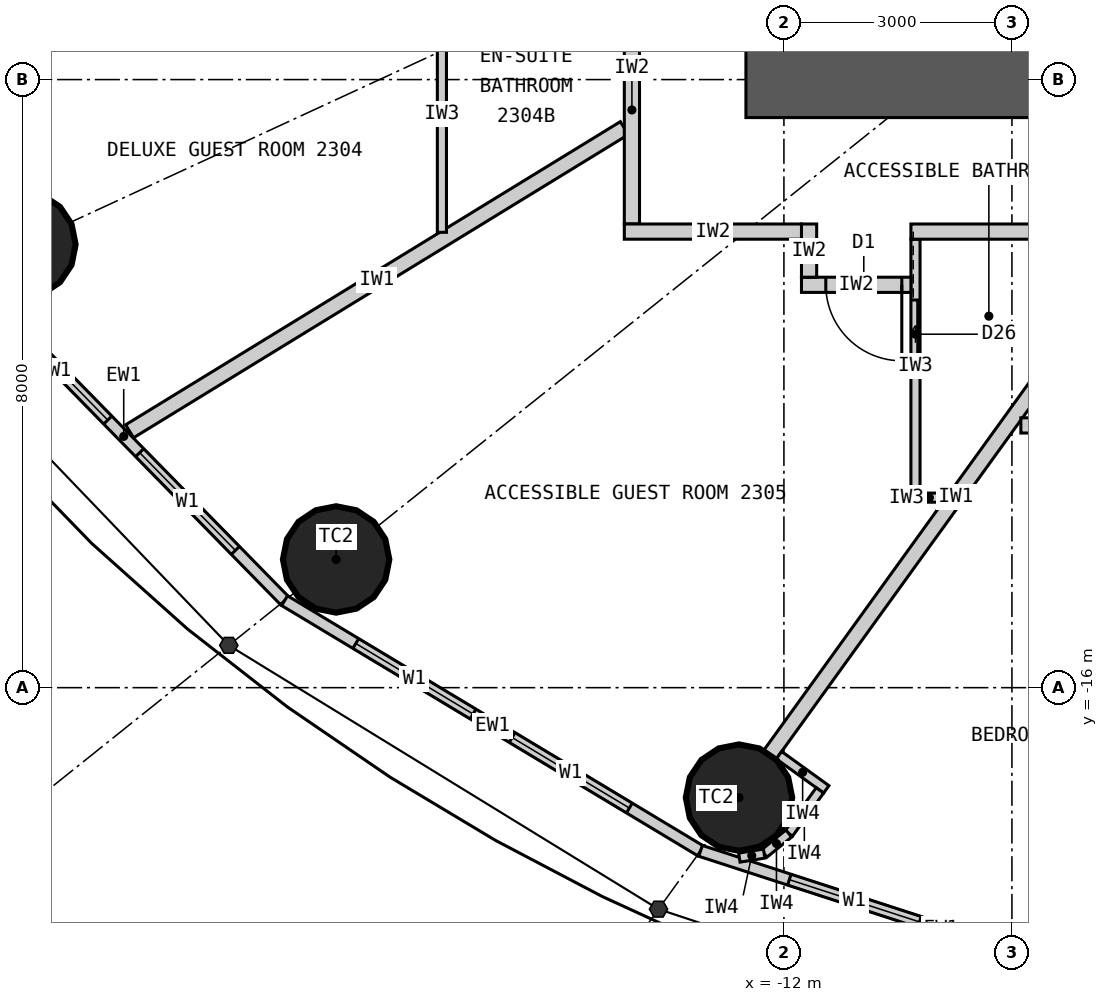
"""IFC4 building model, lengths in metres.
Left out: names, types, materials, properties, quantities, classifications, styles, units other than length and angle.
Written with IfcOpenShell. Run it as: python <this file> out.ifc"""

import sys

from ifc_helpers import new_model, si_unit, direction, frame, frame_2d, origin, origin_2d, place, context, subcontext, project, spatial, rectangle, circle, extrude, clip, halfspace, element, fill, save


model = new_model("IFC4")
c1 = context("Model", 3, precision=1e-05, world=origin(), true_north=direction((0.0, 1.0)))
c2 = subcontext(c1, "Body", "Model", "MODEL_VIEW")
j1 = project(units=[si_unit("LENGTHUNIT", "METRE"), si_unit("PLANEANGLEUNIT", "RADIAN")], contexts=[c1])
p1 = place(None, origin())
s1 = spatial("IfcSite", under=j1, at=p1, CompositionType="ELEMENT")
p2 = place(p1, origin())
s2 = spatial("IfcBuilding", under=s1, at=p2, CompositionType="ELEMENT")
p3 = place(p2, frame((0.0, 0.0, 90.3)))
s3 = spatial("IfcBuildingStorey", under=s2, at=p3, CompositionType="ELEMENT", Elevation=90.3)
for number, where, z_axis, x_axis in (
    (1, (-22.019, -10.17, 0.0), (0.0, 0.0, 1.0), (1.0, 0.0, 0.0)),
    (2, (-17.892, -14.313, 0.0), (0.0, 0.0, 1.0), (1.0, 0.0, 0.0)),
    (3, (-12.591, -17.447, 0.0), (0.0, 0.0, 1.0), (1.0, 0.0, 0.0)),
):
    element("IfcColumn", number, at=place(p3, frame(where, z_axis=z_axis, x_axis=x_axis)), inside=s3, PredefinedType="COLUMN", context=c2, shape_type="Clipping", body=[
        clip(extrude(circle(Radius=0.7, at=origin_2d()), origin(), (0.0, 0.0, 1.0), 3.3), halfspace(frame((0.0, 0.0, 2.25), z_axis=(0.0, 0.0, 1.0), x_axis=(1.0, 0.0, 0.0)), False)),
    ])
p4 = place(p3, frame((12.5, -8.0, 0.0), z_axis=(0.0, 0.0, 1.0), x_axis=(-1.0, 0.0, 0.0)))
e4 = element("IfcWall", 4, at=p4, inside=s3, PredefinedType="SHEAR", context=c2, shape_type="SweptSolid", body=[
    extrude(rectangle(XDim=25.0, YDim=1.0, at=frame_2d((12.5, 0.0))), origin(), (0.0, 0.0, 1.0), 3.3),
])
p5 = place(p4, frame((11.2, 0.0, 0.0)))
e5 = element("IfcOpeningElement", 5, at=p5, cuts=e4, PredefinedType="OPENING", context=c2, shape_type="SweptSolid", body=[
    extrude(rectangle(XDim=1.2, YDim=2.2, at=frame_2d((0.6, 1.1))), frame((0.0, 0.51, 0.0), z_axis=(0.0, -1.0, 0.0), x_axis=(1.0, 0.0, 0.0)), (0.0, 0.0, 1.0), 1.02),
])
p6 = place(p4, frame((18.8, 0.0, 0.0)))
e6 = element("IfcOpeningElement", 6, at=p6, cuts=e4, PredefinedType="OPENING", context=c2, shape_type="SweptSolid", body=[
    extrude(rectangle(XDim=0.9, YDim=2.2, at=frame_2d((0.45, 1.1))), frame((0.0, 0.51, 0.0), z_axis=(0.0, -1.0, 0.0), x_axis=(1.0, 0.0, 0.0)), (0.0, 0.0, 1.0), 1.02),
])
p7 = place(p3, frame((-22.803, -10.532, 0.0), z_axis=(0.0, 0.0, 1.0), x_axis=(0.699602905915, -0.714531856557, 0.0)))
e7 = element("IfcWall", 7, at=p7, inside=s3, PredefinedType="ELEMENTEDWALL", context=c2, shape_type="SweptSolid", body=[
    extrude(rectangle(XDim=6.051, YDim=0.15, at=frame_2d((3.025, 0.0))), origin(), (0.0, 0.0, 1.0), 3.05),
])
p8 = place(p7, frame((0.926, 0.0, 0.9)))
e8 = element("IfcOpeningElement", 8, at=p8, cuts=e7, PredefinedType="OPENING", context=c2, shape_type="SweptSolid", body=[
    extrude(rectangle(XDim=1.8, YDim=1.9, at=frame_2d((0.9, 0.95))), frame((0.0, 0.085, 0.0), z_axis=(0.0, -1.0, 0.0), x_axis=(1.0, 0.0, 0.0)), (0.0, 0.0, 1.0), 0.17),
])
p9 = place(p7, frame((3.325, 0.0, 0.9)))
e9 = element("IfcOpeningElement", 9, at=p9, cuts=e7, PredefinedType="OPENING", context=c2, shape_type="SweptSolid", body=[
    extrude(rectangle(XDim=1.8, YDim=1.9, at=frame_2d((0.9, 0.95))), frame((0.0, 0.085, 0.0), z_axis=(0.0, -1.0, 0.0), x_axis=(1.0, 0.0, 0.0)), (0.0, 0.0, 1.0), 0.17),
])
p10 = place(p3, frame((-18.57, -14.856, 0.0), z_axis=(0.0, 0.0, 1.0), x_axis=(0.856983180864, -0.515344377787, 0.0)))
e10 = element("IfcWall", 10, at=p10, inside=s3, PredefinedType="ELEMENTEDWALL", context=c2, shape_type="SweptSolid", body=[
    extrude(rectangle(XDim=6.386, YDim=0.15, at=frame_2d((3.193, 0.0))), origin(), (0.0, 0.0, 1.0), 3.05),
])
p11 = place(p10, frame((1.093, 0.0, 0.9)))
e11 = element("IfcOpeningElement", 11, at=p11, cuts=e10, PredefinedType="OPENING", context=c2, shape_type="SweptSolid", body=[
    extrude(rectangle(XDim=1.8, YDim=1.9, at=frame_2d((0.9, 0.95))), frame((0.0, 0.085, 0.0), z_axis=(0.0, -1.0, 0.0), x_axis=(1.0, 0.0, 0.0)), (0.0, 0.0, 1.0), 0.17),
])
p12 = place(p10, frame((3.493, 0.0, 0.9)))
e12 = element("IfcOpeningElement", 12, at=p12, cuts=e10, PredefinedType="OPENING", context=c2, shape_type="SweptSolid", body=[
    extrude(rectangle(XDim=1.8, YDim=1.9, at=frame_2d((0.9, 0.95))), frame((0.0, 0.085, 0.0), z_axis=(0.0, -1.0, 0.0), x_axis=(1.0, 0.0, 0.0)), (0.0, 0.0, 1.0), 0.17),
])
p13 = place(p3, frame((-13.096, -18.147, 0.0), z_axis=(0.0, 0.0, 1.0), x_axis=(0.951137534625, -0.308767534285, 0.0)))
e13 = element("IfcWall", 13, at=p13, inside=s3, PredefinedType="ELEMENTEDWALL", context=c2, shape_type="SweptSolid", body=[
    extrude(rectangle(XDim=6.655, YDim=0.15, at=frame_2d((3.328, 0.0))), origin(), (0.0, 0.0, 1.0), 3.05),
])
p14 = place(p13, frame((1.228, 0.0, 0.9)))
e14 = element("IfcOpeningElement", 14, at=p14, cuts=e13, PredefinedType="OPENING", context=c2, shape_type="SweptSolid", body=[
    extrude(rectangle(XDim=1.8, YDim=1.9, at=frame_2d((0.9, 0.95))), frame((0.0, 0.085, 0.0), z_axis=(0.0, -1.0, 0.0), x_axis=(1.0, 0.0, 0.0)), (0.0, 0.0, 1.0), 0.17),
])
p15 = place(p13, frame((3.628, 0.0, 0.9)))
e15 = element("IfcOpeningElement", 15, at=p15, cuts=e13, PredefinedType="OPENING", context=c2, shape_type="SweptSolid", body=[
    extrude(rectangle(XDim=1.8, YDim=1.9, at=frame_2d((0.9, 0.95))), frame((0.0, 0.085, 0.0), z_axis=(0.0, -1.0, 0.0), x_axis=(1.0, 0.0, 0.0)), (0.0, 0.0, 1.0), 0.17),
])
p16 = place(p3, frame((-14.1, -4.663, 0.0), z_axis=(0.0, 0.0, 1.0), x_axis=(-0.949432655039, -0.31397075269, 0.0)))
e16 = element("IfcWall", 16, at=p16, inside=s3, PredefinedType="PARTITIONING", context=c2, shape_type="SweptSolid", body=[
    extrude(rectangle(XDim=10.486, YDim=0.2, at=frame_2d((5.243, 0.0))), origin(), (0.0, 0.0, 1.0), 3.05),
])
p17 = place(p3, frame((-14.1, -8.639, 0.0), z_axis=(0.0, 0.0, 1.0), x_axis=(-0.852672493023, -0.522445805459, 0.0)))
e17 = element("IfcWall", 17, at=p17, inside=s3, PredefinedType="PARTITIONING", context=c2, shape_type="SweptSolid", body=[
    extrude(rectangle(XDim=7.633, YDim=0.2, at=frame_2d((3.817, 0.0))), origin(), (0.0, 0.0, 1.0), 3.05),
])
p18 = place(p3, frame((-7.289, -10.1, 0.0), z_axis=(0.0, 0.0, 1.0), x_axis=(-0.585198353053, -0.810890182197, 0.0)))
e18 = element("IfcWall", 18, at=p18, inside=s3, PredefinedType="PARTITIONING", context=c2, shape_type="SweptSolid", body=[
    extrude(rectangle(XDim=8.36, YDim=0.2, at=frame_2d((4.18, 0.0))), origin(), (0.0, 0.0, 1.0), 2.15),
])
p19 = place(p3, frame((-16.5, -10.01, 0.0), z_axis=(0.0, 0.0, 1.0), x_axis=(0.0, 1.0, 0.0)))
e19 = element("IfcWall", 19, at=p19, inside=s3, PredefinedType="PARTITIONING", context=c2, shape_type="SweptSolid", body=[
    extrude(rectangle(XDim=3.111, YDim=0.12, at=frame_2d((1.555, 0.0))), origin(), (0.0, 0.0, 1.0), 3.05),
])
p20 = place(p3, frame((-9.843, -13.5, 0.0), z_axis=(0.0, 0.0, 1.0), x_axis=(-1.0, 0.0, 0.0)))
e20 = element("IfcWall", 20, at=p20, inside=s3, PredefinedType="PARTITIONING", context=c2, shape_type="SweptSolid", body=[
    extrude(rectangle(XDim=0.486, YDim=0.12, at=frame_2d((0.243, 0.0))), origin(), (0.0, 0.0, 1.0), 3.05),
])
p21 = place(p3, frame((-10.269, -10.1, 0.0), z_axis=(0.0, 0.0, 1.0), x_axis=(0.0, -1.0, 0.0)))
e21 = element("IfcWall", 21, at=p21, inside=s3, PredefinedType="PARTITIONING", context=c2, shape_type="SweptSolid", body=[
    extrude(rectangle(XDim=3.34, YDim=0.12, at=frame_2d((1.67, 0.0))), origin(), (0.0, 0.0, 1.0), 3.05),
])
p22 = place(p21, frame((0.8, 0.0, 0.0)))
e22 = element("IfcOpeningElement", 22, at=p22, cuts=e21, PredefinedType="OPENING", context=c2, shape_type="SweptSolid", body=[
    extrude(rectangle(XDim=0.9, YDim=2.1, at=frame_2d((0.45, 1.05))), frame((0.0, 0.07, 0.0), z_axis=(0.0, -1.0, 0.0), x_axis=(1.0, 0.0, 0.0)), (0.0, 0.0, 1.0), 0.14),
])
p23 = place(p3, frame((-8.883, -12.55, 0.0), z_axis=(0.0, 0.0, 1.0), x_axis=(1.0, 0.0, 0.0)))
e23 = element("IfcWall", 23, at=p23, inside=s3, PredefinedType="PARTITIONING", context=c2, shape_type="SweptSolid", body=[
    extrude(rectangle(XDim=17.765, YDim=0.2, at=frame_2d((8.883, 0.0))), origin(), (0.0, 0.0, 1.0), 3.05),
])
p24 = place(p23, frame((3.42, 0.0, 0.0)))
e24 = element("IfcOpeningElement", 24, at=p24, cuts=e23, PredefinedType="OPENING", context=c2, shape_type="SweptSolid", body=[
    extrude(rectangle(XDim=0.8, YDim=2.1, at=frame_2d((0.4, 1.05))), frame((0.0, 0.11, 0.0), z_axis=(0.0, -1.0, 0.0), x_axis=(1.0, 0.0, 0.0)), (0.0, 0.0, 1.0), 0.22),
])
p25 = place(p23, frame((13.52, 0.0, 0.0)))
e25 = element("IfcOpeningElement", 25, at=p25, cuts=e23, PredefinedType="OPENING", context=c2, shape_type="SweptSolid", body=[
    extrude(rectangle(XDim=0.8, YDim=2.1, at=frame_2d((0.4, 1.05))), frame((0.0, 0.11, 0.0), z_axis=(0.0, -1.0, 0.0), x_axis=(1.0, 0.0, 0.0)), (0.0, 0.0, 1.0), 0.22),
])
p26 = place(p23, frame((8.42, 0.0, 0.0)))
e26 = element("IfcOpeningElement", 26, at=p26, cuts=e23, PredefinedType="OPENING", context=c2, shape_type="SweptSolid", body=[
    extrude(rectangle(XDim=0.9, YDim=2.1, at=frame_2d((0.45, 1.05))), frame((0.0, 0.11, 0.0), z_axis=(0.0, -1.0, 0.0), x_axis=(1.0, 0.0, 0.0)), (0.0, 0.0, 1.0), 0.22),
])
p27 = place(p3, frame((-10.329, -10.7, 0.0), z_axis=(0.0, 0.0, 1.0), x_axis=(-1.0, 0.0, 0.0)))
e27 = element("IfcWall", 27, at=p27, inside=s3, PredefinedType="PARTITIONING", context=c2, shape_type="SweptSolid", body=[
    extrude(rectangle(XDim=1.44, YDim=0.2, at=frame_2d((0.72, 0.0))), origin(), (0.0, 0.0, 1.0), 3.05),
])
p28 = place(p27, frame((0.12, 0.0, 0.0)))
e28 = element("IfcOpeningElement", 28, at=p28, cuts=e27, PredefinedType="OPENING", context=c2, shape_type="SweptSolid", body=[
    extrude(rectangle(XDim=1.0, YDim=2.2, at=frame_2d((0.5, 1.1))), frame((0.0, 0.11, 0.0), z_axis=(0.0, -1.0, 0.0), x_axis=(1.0, 0.0, 0.0)), (0.0, 0.0, 1.0), 0.22),
])
p29 = place(p3, frame((-11.669, -9.9, 0.0), z_axis=(0.0, 0.0, 1.0), x_axis=(0.0, -1.0, 0.0)))
e29 = element("IfcWall", 29, at=p29, inside=s3, PredefinedType="PARTITIONING", context=c2, shape_type="SweptSolid", body=[
    extrude(rectangle(XDim=0.7, YDim=0.2, at=frame_2d((0.35, 0.0))), origin(), (0.0, 0.0, 1.0), 3.05),
])
p30 = place(p3, frame((-14.0, -6.899, 0.0), z_axis=(0.0, 0.0, 1.0), x_axis=(0.0, -1.0, 0.0)))
e30 = element("IfcWall", 30, at=p30, inside=s3, PredefinedType="PARTITIONING", context=c2, shape_type="SweptSolid", body=[
    extrude(rectangle(XDim=3.001, YDim=0.2, at=frame_2d((1.5, 0.0))), origin(), (0.0, 0.0, 1.0), 3.05),
])
p31 = place(p3, frame((14.1, -10.0, 0.0), z_axis=(0.0, 0.0, 1.0), x_axis=(-1.0, 0.0, 0.0)))
e31 = element("IfcWall", 31, at=p31, inside=s3, PredefinedType="PARTITIONING", context=c2, shape_type="SweptSolid", body=[
    extrude(rectangle(XDim=24.429, YDim=0.2, at=frame_2d((12.215, 0.0))), origin(), (0.0, 0.0, 1.0), 3.05),
])
p32 = place(p31, frame((13.597, 0.0, 0.0)))
e32 = element("IfcOpeningElement", 32, at=p32, cuts=e31, PredefinedType="OPENING", context=c2, shape_type="SweptSolid", body=[
    extrude(rectangle(XDim=1.0, YDim=2.2, at=frame_2d((0.5, 1.1))), frame((0.0, 0.11, 0.0), z_axis=(0.0, -1.0, 0.0), x_axis=(1.0, 0.0, 0.0)), (0.0, 0.0, 1.0), 0.22),
])
p33 = place(p3, frame((-11.769, -10.0, 0.0), z_axis=(0.0, 0.0, 1.0), x_axis=(-1.0, 0.0, 0.0)))
e33 = element("IfcWall", 33, at=p33, inside=s3, PredefinedType="PARTITIONING", context=c2, shape_type="SweptSolid", body=[
    extrude(rectangle(XDim=2.331, YDim=0.2, at=frame_2d((1.166, 0.0))), origin(), (0.0, 0.0, 1.0), 3.05),
])
p34 = place(p3, frame((-12.065, -16.889, 0.0), z_axis=(0.0, 0.0, 1.0), x_axis=(0.810821798253, -0.585293098778, 0.0)))
e34 = element("IfcWall", 34, at=p34, inside=s3, PredefinedType="PARTITIONING", context=c2, shape_type="SweptSolid", body=[
    extrude(rectangle(XDim=0.768, YDim=0.12, at=frame_2d((0.384, 0.0))), origin(), (0.0, 0.0, 1.0), 3.05),
])
p35 = place(p3, frame((-11.526, -17.351, 0.0), z_axis=(0.0, 0.0, 1.0), x_axis=(-0.585223113993, -0.810872312296, 0.0)))
e35 = element("IfcWall", 35, at=p35, inside=s3, PredefinedType="PARTITIONING", context=c2, shape_type="SweptSolid", body=[
    extrude(rectangle(XDim=0.7, YDim=0.12, at=frame_2d((0.35, 0.0))), origin(), (0.0, 0.0, 1.0), 3.05),
])
p36 = place(p3, frame((-11.936, -17.919, 0.0), z_axis=(0.0, 0.0, 1.0), x_axis=(-0.775023088441, -0.631932917629, 0.0)))
e36 = element("IfcWall", 36, at=p36, inside=s3, PredefinedType="PARTITIONING", context=c2, shape_type="SweptSolid", body=[
    extrude(rectangle(XDim=0.418, YDim=0.12, at=frame_2d((0.209, 0.0))), origin(), (0.0, 0.0, 1.0), 3.05),
])
p37 = place(p3, frame((-12.26, -18.183, 0.0), z_axis=(0.0, 0.0, 1.0), x_axis=(-0.987218661664, -0.159371622511, 0.0)))
e37 = element("IfcWall", 37, at=p37, inside=s3, PredefinedType="PARTITIONING", context=c2, shape_type="SweptSolid", body=[
    extrude(rectangle(XDim=0.331, YDim=0.12, at=frame_2d((0.166, 0.0))), origin(), (0.0, 0.0, 1.0), 3.05),
])
p38 = place(p8, origin())
e38 = element("IfcWindow", 38, at=p38, inside=s3, PartitioningType="SINGLE_PANEL", PredefinedType="WINDOW", context=c2, shape_type="SweptSolid", body=[
    extrude(rectangle(XDim=1.8, YDim=1.9, at=frame_2d((0.9, 0.95))), frame((0.0, 0.03, 0.0), z_axis=(0.0, -1.0, 0.0), x_axis=(1.0, 0.0, 0.0)), (0.0, 0.0, 1.0), 0.06),
])
fill(e8, e38)
p39 = place(p9, origin())
e39 = element("IfcWindow", 39, at=p39, inside=s3, PartitioningType="SINGLE_PANEL", PredefinedType="WINDOW", context=c2, shape_type="SweptSolid", body=[
    extrude(rectangle(XDim=1.8, YDim=1.9, at=frame_2d((0.9, 0.95))), frame((0.0, 0.03, 0.0), z_axis=(0.0, -1.0, 0.0), x_axis=(1.0, 0.0, 0.0)), (0.0, 0.0, 1.0), 0.06),
])
fill(e9, e39)
p40 = place(p11, origin())
e40 = element("IfcWindow", 40, at=p40, inside=s3, PartitioningType="SINGLE_PANEL", PredefinedType="WINDOW", context=c2, shape_type="SweptSolid", body=[
    extrude(rectangle(XDim=1.8, YDim=1.9, at=frame_2d((0.9, 0.95))), frame((0.0, 0.03, 0.0), z_axis=(0.0, -1.0, 0.0), x_axis=(1.0, 0.0, 0.0)), (0.0, 0.0, 1.0), 0.06),
])
fill(e11, e40)
p41 = place(p12, origin())
e41 = element("IfcWindow", 41, at=p41, inside=s3, PartitioningType="SINGLE_PANEL", PredefinedType="WINDOW", context=c2, shape_type="SweptSolid", body=[
    extrude(rectangle(XDim=1.8, YDim=1.9, at=frame_2d((0.9, 0.95))), frame((0.0, 0.03, 0.0), z_axis=(0.0, -1.0, 0.0), x_axis=(1.0, 0.0, 0.0)), (0.0, 0.0, 1.0), 0.06),
])
fill(e12, e41)
p42 = place(p14, origin())
e42 = element("IfcWindow", 42, at=p42, inside=s3, PartitioningType="SINGLE_PANEL", PredefinedType="WINDOW", context=c2, shape_type="SweptSolid", body=[
    extrude(rectangle(XDim=1.8, YDim=1.9, at=frame_2d((0.9, 0.95))), frame((0.0, 0.03, 0.0), z_axis=(0.0, -1.0, 0.0), x_axis=(1.0, 0.0, 0.0)), (0.0, 0.0, 1.0), 0.06),
])
fill(e14, e42)
p43 = place(p22, origin())
e43 = element("IfcDoor", 43, at=p43, inside=s3, OperationType="SLIDING_TO_LEFT", PredefinedType="DOOR", context=c2, shape_type="SweptSolid", body=[
    extrude(rectangle(XDim=0.9, YDim=2.1, at=frame_2d((0.45, 1.05))), frame((0.0, 0.025, 0.0), z_axis=(0.0, -1.0, 0.0), x_axis=(1.0, 0.0, 0.0)), (0.0, 0.0, 1.0), 0.05),
])
fill(e22, e43)
p44 = place(p28, origin())
e44 = element("IfcDoor", 44, at=p44, inside=s3, OperationType="SINGLE_SWING_LEFT", PredefinedType="DOOR", context=c2, shape_type="SweptSolid", body=[
    extrude(rectangle(XDim=1.0, YDim=2.2, at=frame_2d((0.5, 1.1))), frame((0.0, 0.025, 0.0), z_axis=(0.0, -1.0, 0.0), x_axis=(1.0, 0.0, 0.0)), (0.0, 0.0, 1.0), 0.05),
])
fill(e28, e44)
save(model, sys.argv[1])
